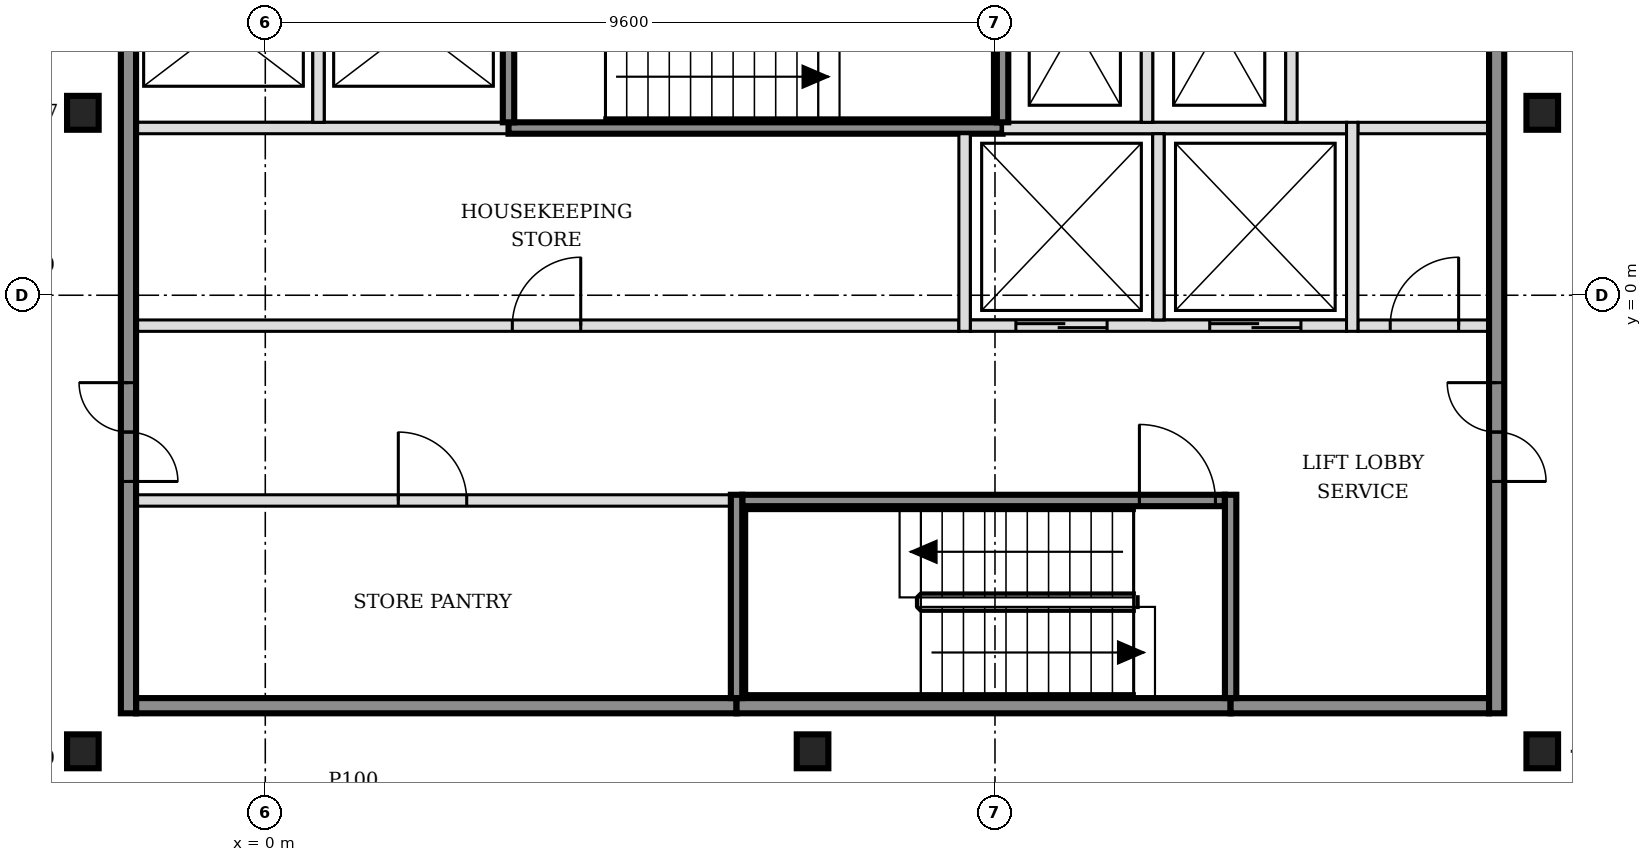
"""IFC4 building model, lengths in metres.
Left out: names, types, materials, properties, quantities, classifications, styles, units other than length and angle.
Written with IfcOpenShell. Run it as: python <this file> out.ifc"""

import sys

from ifc_helpers import new_model, si_unit, direction, frame, frame_2d, origin, origin_2d, place, context, subcontext, project, spatial, rectangle, i_section, extrude, element, fill, save


model = new_model("IFC4")
c1 = context("Model", 3, precision=1e-05, world=origin(), true_north=direction((0.0, 1.0)))
c2 = subcontext(c1, "Body", "Model", "MODEL_VIEW")
j1 = project(units=[si_unit("LENGTHUNIT", "METRE"), si_unit("PLANEANGLEUNIT", "RADIAN")], contexts=[c1])
p1 = place(None, origin())
s1 = spatial("IfcSite", under=j1, at=p1, CompositionType="ELEMENT")
p2 = place(p1, origin())
s2 = spatial("IfcBuilding", under=s1, at=p2, CompositionType="ELEMENT")
p3 = place(p2, frame((0.0, 0.0, 175.8)))
s3 = spatial("IfcBuildingStorey", under=s2, at=p3, CompositionType="ELEMENT", Elevation=175.8)
for number, where, z_axis, x_axis in (
    (1, (-2.4, -6.0, -0.15), (0.0, 0.0, 1.0), (1.0, 0.0, 0.0)),
    (2, (7.2, -6.0, -0.15), (0.0, 0.0, 1.0), (1.0, 0.0, 0.0)),
    (3, (16.8, -6.0, -0.15), (0.0, 0.0, 1.0), (1.0, 0.0, 0.0)),
    (4, (-2.4, 2.4, -0.15), (0.0, 0.0, 1.0), (1.0, 0.0, 0.0)),
    (5, (16.8, 2.4, -0.15), (0.0, 0.0, 1.0), (1.0, 0.0, 0.0)),
):
    element("IfcColumn", number, at=place(p3, frame(where, z_axis=z_axis, x_axis=x_axis)), inside=s3, PredefinedType="COLUMN", context=c2, shape_type="SweptSolid", body=[
        extrude(i_section(OverallWidth=0.416, OverallDepth=0.446, WebThickness=0.039, FlangeThickness=0.063, FilletRadius=0.015, at=origin_2d()), origin(), (0.0, 0.0, 1.0), 3.6),
    ])
p4 = place(p3, frame((-1.7, -5.4, 0.0), z_axis=(0.0, 0.0, 1.0), x_axis=(1.0, 0.0, 0.0)))
e6 = element("IfcWall", 6, at=p4, inside=s3, PredefinedType="SOLIDWALL", context=c2, shape_type="SweptSolid", body=[
    extrude(rectangle(XDim=7.9, YDim=0.2, at=frame_2d((3.95, 0.0))), origin(), (0.0, 0.0, 1.0), 3.45),
])
p5 = place(p3, frame((6.2, -5.4, 0.0), z_axis=(0.0, 0.0, 1.0), x_axis=(1.0, 0.0, 0.0)))
e7 = element("IfcWall", 7, at=p5, inside=s3, PredefinedType="SOLIDWALL", context=c2, shape_type="SweptSolid", body=[
    extrude(rectangle(XDim=6.5, YDim=0.2, at=frame_2d((3.25, 0.0))), origin(), (0.0, 0.0, 1.0), 3.45),
])
p6 = place(p3, frame((12.7, -5.4, 0.0), z_axis=(0.0, 0.0, 1.0), x_axis=(1.0, 0.0, 0.0)))
e8 = element("IfcWall", 8, at=p6, inside=s3, PredefinedType="SOLIDWALL", context=c2, shape_type="SweptSolid", body=[
    extrude(rectangle(XDim=3.4, YDim=0.2, at=frame_2d((1.7, 0.0))), origin(), (0.0, 0.0, 1.0), 3.45),
])
p7 = place(p3, frame((-1.7, -2.7, 0.0), z_axis=(0.0, 0.0, 1.0), x_axis=(1.0, 0.0, 0.0)))
e9 = element("IfcWall", 9, at=p7, inside=s3, PredefinedType="PARTITIONING", context=c2, shape_type="SweptSolid", body=[
    extrude(rectangle(XDim=7.825, YDim=0.15, at=frame_2d((3.913, 0.0))), origin(), (0.0, 0.0, 1.0), 3.45),
])
p8 = place(p7, frame((3.45, 0.0, 0.0)))
e10 = element("IfcOpeningElement", 10, at=p8, cuts=e9, PredefinedType="OPENING", context=c2, shape_type="SweptSolid", body=[
    extrude(rectangle(XDim=0.9, YDim=2.1, at=frame_2d((0.45, 1.05))), frame((0.0, 0.085, 0.0), z_axis=(0.0, -1.0, 0.0), x_axis=(1.0, 0.0, 0.0)), (0.0, 0.0, 1.0), 0.17),
])
p9 = place(p3, frame((6.275, -2.7, 0.0), z_axis=(0.0, 0.0, 1.0), x_axis=(1.0, 0.0, 0.0)))
e11 = element("IfcWall", 11, at=p9, inside=s3, PredefinedType="SOLIDWALL", context=c2, shape_type="SweptSolid", body=[
    extrude(rectangle(XDim=6.35, YDim=0.15, at=frame_2d((3.175, 0.0))), origin(), (0.0, 0.0, 1.0), 3.45),
])
p10 = place(p9, frame((5.225, 0.0, 0.0)))
e12 = element("IfcOpeningElement", 12, at=p10, cuts=e11, PredefinedType="OPENING", context=c2, shape_type="SweptSolid", body=[
    extrude(rectangle(XDim=1.0, YDim=2.1, at=frame_2d((0.5, 1.05))), frame((0.0, 0.085, 0.0), z_axis=(0.0, -1.0, 0.0), x_axis=(1.0, 0.0, 0.0)), (0.0, 0.0, 1.0), 0.17),
])
p11 = place(p3, frame((-1.7, -0.4, 0.0), z_axis=(0.0, 0.0, 1.0), x_axis=(1.0, 0.0, 0.0)))
e13 = element("IfcWall", 13, at=p11, inside=s3, PredefinedType="PARTITIONING", context=c2, shape_type="SweptSolid", body=[
    extrude(rectangle(XDim=10.825, YDim=0.15, at=frame_2d((5.413, 0.0))), origin(), (0.0, 0.0, 1.0), 3.45),
])
p12 = place(p11, frame((4.95, 0.0, 0.0)))
e14 = element("IfcOpeningElement", 14, at=p12, cuts=e13, PredefinedType="OPENING", context=c2, shape_type="SweptSolid", body=[
    extrude(rectangle(XDim=0.9, YDim=2.1, at=frame_2d((0.45, 1.05))), frame((0.0, 0.085, 0.0), z_axis=(0.0, -1.0, 0.0), x_axis=(1.0, 0.0, 0.0)), (0.0, 0.0, 1.0), 0.17),
])
p13 = place(p3, frame((9.275, -0.4, 0.0), z_axis=(0.0, 0.0, 1.0), x_axis=(1.0, 0.0, 0.0)))
e15 = element("IfcWall", 15, at=p13, inside=s3, PredefinedType="SOLIDWALL", context=c2, shape_type="SweptSolid", body=[
    extrude(rectangle(XDim=4.95, YDim=0.15, at=frame_2d((2.475, 0.0))), origin(), (0.0, 0.0, 1.0), 3.45),
])
p14 = place(p13, frame((0.6, 0.0, 0.0)))
e16 = element("IfcOpeningElement", 16, at=p14, cuts=e15, PredefinedType="OPENING", context=c2, shape_type="SweptSolid", body=[
    extrude(rectangle(XDim=1.2, YDim=2.1, at=frame_2d((0.6, 1.05))), frame((0.0, 0.085, 0.0), z_axis=(0.0, -1.0, 0.0), x_axis=(1.0, 0.0, 0.0)), (0.0, 0.0, 1.0), 0.17),
])
p15 = place(p13, frame((3.15, 0.0, 0.0)))
e17 = element("IfcOpeningElement", 17, at=p15, cuts=e15, PredefinedType="OPENING", context=c2, shape_type="SweptSolid", body=[
    extrude(rectangle(XDim=1.2, YDim=2.1, at=frame_2d((0.6, 1.05))), frame((0.0, 0.085, 0.0), z_axis=(0.0, -1.0, 0.0), x_axis=(1.0, 0.0, 0.0)), (0.0, 0.0, 1.0), 0.17),
])
p16 = place(p3, frame((14.375, -0.4, 0.0), z_axis=(0.0, 0.0, 1.0), x_axis=(1.0, 0.0, 0.0)))
e18 = element("IfcWall", 18, at=p16, inside=s3, PredefinedType="PARTITIONING", context=c2, shape_type="SweptSolid", body=[
    extrude(rectangle(XDim=1.725, YDim=0.15, at=frame_2d((0.863, 0.0))), origin(), (0.0, 0.0, 1.0), 3.45),
])
p17 = place(p16, frame((0.425, 0.0, 0.0)))
e19 = element("IfcOpeningElement", 19, at=p17, cuts=e18, PredefinedType="OPENING", context=c2, shape_type="SweptSolid", body=[
    extrude(rectangle(XDim=0.9, YDim=2.1, at=frame_2d((0.45, 1.05))), frame((0.0, 0.085, 0.0), z_axis=(0.0, -1.0, 0.0), x_axis=(1.0, 0.0, 0.0)), (0.0, 0.0, 1.0), 0.17),
])
p18 = place(p3, frame((-1.7, 2.2, 0.0), z_axis=(0.0, 0.0, 1.0), x_axis=(1.0, 0.0, 0.0)))
e20 = element("IfcWall", 20, at=p18, inside=s3, PredefinedType="SOLIDWALL", context=c2, shape_type="SweptSolid", body=[
    extrude(rectangle(XDim=4.9, YDim=0.15, at=frame_2d((2.45, 0.0))), origin(), (0.0, 0.0, 1.0), 3.45),
])
p19 = place(p3, frame((3.2, 2.2, 0.0), z_axis=(0.0, 0.0, 1.0), x_axis=(1.0, 0.0, 0.0)))
e21 = element("IfcWall", 21, at=p19, inside=s3, PredefinedType="SOLIDWALL", context=c2, shape_type="SweptSolid", body=[
    extrude(rectangle(XDim=6.5, YDim=0.15, at=frame_2d((3.25, 0.0))), origin(), (0.0, 0.0, 1.0), 3.45),
])
p20 = place(p3, frame((9.7, 2.2, 0.0), z_axis=(0.0, 0.0, 1.0), x_axis=(1.0, 0.0, 0.0)))
e22 = element("IfcWall", 22, at=p20, inside=s3, PredefinedType="SOLIDWALL", context=c2, shape_type="SweptSolid", body=[
    extrude(rectangle(XDim=4.525, YDim=0.15, at=frame_2d((2.263, 0.0))), origin(), (0.0, 0.0, 1.0), 3.45),
])
p21 = place(p3, frame((14.375, 2.2, 0.0), z_axis=(0.0, 0.0, 1.0), x_axis=(1.0, 0.0, 0.0)))
e23 = element("IfcWall", 23, at=p21, inside=s3, PredefinedType="PARTITIONING", context=c2, shape_type="SweptSolid", body=[
    extrude(rectangle(XDim=1.725, YDim=0.15, at=frame_2d((0.863, 0.0))), origin(), (0.0, 0.0, 1.0), 3.45),
])
p22 = place(p3, frame((-1.8, -5.5, 0.0), z_axis=(0.0, 0.0, 1.0), x_axis=(0.0, 1.0, 0.0)))
e24 = element("IfcWall", 24, at=p22, inside=s3, PredefinedType="SOLIDWALL", context=c2, shape_type="SweptSolid", body=[
    extrude(rectangle(XDim=15.8, YDim=0.2, at=frame_2d((7.9, 0.0))), origin(), (0.0, 0.0, 1.0), 3.45),
])
p23 = place(p22, frame((3.05, 0.0, 0.0)))
e25 = element("IfcOpeningElement", 25, at=p23, cuts=e24, PredefinedType="OPENING", context=c2, shape_type="SweptSolid", body=[
    extrude(rectangle(XDim=1.3, YDim=2.1, at=frame_2d((0.65, 1.05))), frame((0.0, 0.11, 0.0), z_axis=(0.0, -1.0, 0.0), x_axis=(1.0, 0.0, 0.0)), (0.0, 0.0, 1.0), 0.22),
])
p24 = place(p22, frame((11.45, 0.0, 0.0)))
e26 = element("IfcOpeningElement", 26, at=p24, cuts=e24, PredefinedType="OPENING", context=c2, shape_type="SweptSolid", body=[
    extrude(rectangle(XDim=1.3, YDim=2.1, at=frame_2d((0.65, 1.05))), frame((0.0, 0.11, 0.0), z_axis=(0.0, -1.0, 0.0), x_axis=(1.0, 0.0, 0.0)), (0.0, 0.0, 1.0), 0.22),
])
for number, where, z_axis, x_axis in (
    (27, (0.7, 2.275, 0.0), (0.0, 0.0, 1.0), (0.0, 1.0, 0.0)),
    (28, (3.2, 2.275, 0.0), (0.0, 0.0, 1.0), (0.0, 1.0, 0.0)),
):
    element("IfcWall", number, at=place(p3, frame(where, z_axis=z_axis, x_axis=x_axis)), inside=s3, PredefinedType="SOLIDWALL", context=c2, shape_type="SweptSolid", body=[
        extrude(rectangle(XDim=2.55, YDim=0.15, at=frame_2d((1.275, 0.0))), origin(), (0.0, 0.0, 1.0), 3.45),
    ])
p25 = place(p3, frame((6.2, -5.3, 0.0), z_axis=(0.0, 0.0, 1.0), x_axis=(0.0, 1.0, 0.0)))
e29 = element("IfcWall", 29, at=p25, inside=s3, PredefinedType="SOLIDWALL", context=c2, shape_type="SweptSolid", body=[
    extrude(rectangle(XDim=2.675, YDim=0.15, at=frame_2d((1.337, 0.0))), origin(), (0.0, 0.0, 1.0), 3.45),
])
p26 = place(p3, frame((9.2, -0.475, 0.0), z_axis=(0.0, 0.0, 1.0), x_axis=(0.0, 1.0, 0.0)))
e30 = element("IfcWall", 30, at=p26, inside=s3, PredefinedType="SOLIDWALL", context=c2, shape_type="SweptSolid", body=[
    extrude(rectangle(XDim=2.6, YDim=0.15, at=frame_2d((1.3, 0.0))), origin(), (0.0, 0.0, 1.0), 3.45),
])
for number, where, z_axis, x_axis in (
    (31, (9.7, 2.275, 0.0), (0.0, 0.0, 1.0), (0.0, 1.0, 0.0)),
    (32, (11.6, 2.275, 0.0), (0.0, 0.0, 1.0), (0.0, 1.0, 0.0)),
):
    element("IfcWall", number, at=place(p3, frame(where, z_axis=z_axis, x_axis=x_axis)), inside=s3, PredefinedType="SOLIDWALL", context=c2, shape_type="SweptSolid", body=[
        extrude(rectangle(XDim=2.55, YDim=0.15, at=frame_2d((1.275, 0.0))), origin(), (0.0, 0.0, 1.0), 3.45),
    ])
p27 = place(p3, frame((11.75, -0.325, 0.0), z_axis=(0.0, 0.0, 1.0), x_axis=(0.0, 1.0, 0.0)))
e33 = element("IfcWall", 33, at=p27, inside=s3, PredefinedType="SOLIDWALL", context=c2, shape_type="SweptSolid", body=[
    extrude(rectangle(XDim=2.45, YDim=0.15, at=frame_2d((1.225, 0.0))), origin(), (0.0, 0.0, 1.0), 3.45),
])
p28 = place(p3, frame((12.7, -5.3, 0.0), z_axis=(0.0, 0.0, 1.0), x_axis=(0.0, 1.0, 0.0)))
e34 = element("IfcWall", 34, at=p28, inside=s3, PredefinedType="SOLIDWALL", context=c2, shape_type="SweptSolid", body=[
    extrude(rectangle(XDim=2.675, YDim=0.15, at=frame_2d((1.337, 0.0))), origin(), (0.0, 0.0, 1.0), 3.45),
])
p29 = place(p3, frame((13.5, 2.275, 0.0), z_axis=(0.0, 0.0, 1.0), x_axis=(0.0, 1.0, 0.0)))
e35 = element("IfcWall", 35, at=p29, inside=s3, PredefinedType="SOLIDWALL", context=c2, shape_type="SweptSolid", body=[
    extrude(rectangle(XDim=2.55, YDim=0.15, at=frame_2d((1.275, 0.0))), origin(), (0.0, 0.0, 1.0), 3.45),
])
p30 = place(p3, frame((14.3, -0.475, 0.0), z_axis=(0.0, 0.0, 1.0), x_axis=(0.0, 1.0, 0.0)))
e36 = element("IfcWall", 36, at=p30, inside=s3, PredefinedType="SOLIDWALL", context=c2, shape_type="SweptSolid", body=[
    extrude(rectangle(XDim=2.75, YDim=0.15, at=frame_2d((1.375, 0.0))), origin(), (0.0, 0.0, 1.0), 3.45),
])
p31 = place(p3, frame((16.2, -5.5, 0.0), z_axis=(0.0, 0.0, 1.0), x_axis=(0.0, 1.0, 0.0)))
e37 = element("IfcWall", 37, at=p31, inside=s3, PredefinedType="SOLIDWALL", context=c2, shape_type="SweptSolid", body=[
    extrude(rectangle(XDim=15.8, YDim=0.2, at=frame_2d((7.9, 0.0))), origin(), (0.0, 0.0, 1.0), 3.45),
])
p32 = place(p31, frame((3.05, 0.0, 0.0)))
e38 = element("IfcOpeningElement", 38, at=p32, cuts=e37, PredefinedType="OPENING", context=c2, shape_type="SweptSolid", body=[
    extrude(rectangle(XDim=1.3, YDim=2.1, at=frame_2d((0.65, 1.05))), frame((0.0, 0.11, 0.0), z_axis=(0.0, -1.0, 0.0), x_axis=(1.0, 0.0, 0.0)), (0.0, 0.0, 1.0), 0.22),
])
p33 = place(p31, frame((11.45, 0.0, 0.0)))
e39 = element("IfcOpeningElement", 39, at=p33, cuts=e37, PredefinedType="OPENING", context=c2, shape_type="SweptSolid", body=[
    extrude(rectangle(XDim=1.3, YDim=2.1, at=frame_2d((0.65, 1.05))), frame((0.0, 0.11, 0.0), z_axis=(0.0, -1.0, 0.0), x_axis=(1.0, 0.0, 0.0)), (0.0, 0.0, 1.0), 0.22),
])
p34 = place(p14, origin())
e40 = element("IfcDoor", 40, at=p34, inside=s3, OperationType="DOUBLE_DOOR_SLIDING", PredefinedType="DOOR", context=c2, shape_type="SweptSolid", body=[
    extrude(rectangle(XDim=1.2, YDim=2.1, at=frame_2d((0.6, 1.05))), frame((0.0, 0.025, 0.0), z_axis=(0.0, -1.0, 0.0), x_axis=(1.0, 0.0, 0.0)), (0.0, 0.0, 1.0), 0.05),
])
fill(e16, e40)
p35 = place(p15, origin())
e41 = element("IfcDoor", 41, at=p35, inside=s3, OperationType="DOUBLE_DOOR_SLIDING", PredefinedType="DOOR", context=c2, shape_type="SweptSolid", body=[
    extrude(rectangle(XDim=1.2, YDim=2.1, at=frame_2d((0.6, 1.05))), frame((0.0, 0.025, 0.0), z_axis=(0.0, -1.0, 0.0), x_axis=(1.0, 0.0, 0.0)), (0.0, 0.0, 1.0), 0.05),
])
fill(e17, e41)
p36 = place(p10, origin())
e42 = element("IfcDoor", 42, at=p36, inside=s3, OperationType="SINGLE_SWING_LEFT", PredefinedType="DOOR", context=c2, shape_type="SweptSolid", body=[
    extrude(rectangle(XDim=1.0, YDim=2.1, at=frame_2d((0.5, 1.05))), frame((0.0, 0.025, 0.0), z_axis=(0.0, -1.0, 0.0), x_axis=(1.0, 0.0, 0.0)), (0.0, 0.0, 1.0), 0.05),
])
fill(e12, e42)
p37 = place(p23, origin())
e43 = element("IfcDoor", 43, at=p37, inside=s3, OperationType="DOUBLE_DOOR_SINGLE_SWING", PredefinedType="DOOR", context=c2, shape_type="SweptSolid", body=[
    extrude(rectangle(XDim=1.3, YDim=2.1, at=frame_2d((0.65, 1.05))), frame((0.0, 0.025, 0.0), z_axis=(0.0, -1.0, 0.0), x_axis=(1.0, 0.0, 0.0)), (0.0, 0.0, 1.0), 0.05),
])
fill(e25, e43)
p38 = place(p32, origin())
e44 = element("IfcDoor", 44, at=p38, inside=s3, OperationType="DOUBLE_DOOR_SINGLE_SWING", PredefinedType="DOOR", context=c2, shape_type="SweptSolid", body=[
    extrude(rectangle(XDim=1.3, YDim=2.1, at=frame_2d((0.65, 1.05))), frame((0.0, 0.025, 0.0), z_axis=(0.0, -1.0, 0.0), x_axis=(1.0, 0.0, 0.0)), (0.0, 0.0, 1.0), 0.05),
])
fill(e38, e44)
p39 = place(p17, origin())
e45 = element("IfcDoor", 45, at=p39, inside=s3, OperationType="SINGLE_SWING_RIGHT", PredefinedType="DOOR", context=c2, shape_type="SweptSolid", body=[
    extrude(rectangle(XDim=0.9, YDim=2.1, at=frame_2d((0.45, 1.05))), frame((0.0, 0.025, 0.0), z_axis=(0.0, -1.0, 0.0), x_axis=(1.0, 0.0, 0.0)), (0.0, 0.0, 1.0), 0.05),
])
fill(e19, e45)
p40 = place(p8, origin())
e46 = element("IfcDoor", 46, at=p40, inside=s3, OperationType="SINGLE_SWING_LEFT", PredefinedType="DOOR", context=c2, shape_type="SweptSolid", body=[
    extrude(rectangle(XDim=0.9, YDim=2.1, at=frame_2d((0.45, 1.05))), frame((0.0, 0.025, 0.0), z_axis=(0.0, -1.0, 0.0), x_axis=(1.0, 0.0, 0.0)), (0.0, 0.0, 1.0), 0.05),
])
fill(e10, e46)
p41 = place(p12, origin())
e47 = element("IfcDoor", 47, at=p41, inside=s3, OperationType="SINGLE_SWING_RIGHT", PredefinedType="DOOR", context=c2, shape_type="SweptSolid", body=[
    extrude(rectangle(XDim=0.9, YDim=2.1, at=frame_2d((0.45, 1.05))), frame((0.0, 0.025, 0.0), z_axis=(0.0, -1.0, 0.0), x_axis=(1.0, 0.0, 0.0)), (0.0, 0.0, 1.0), 0.05),
])
fill(e14, e47)
save(model, sys.argv[1])
